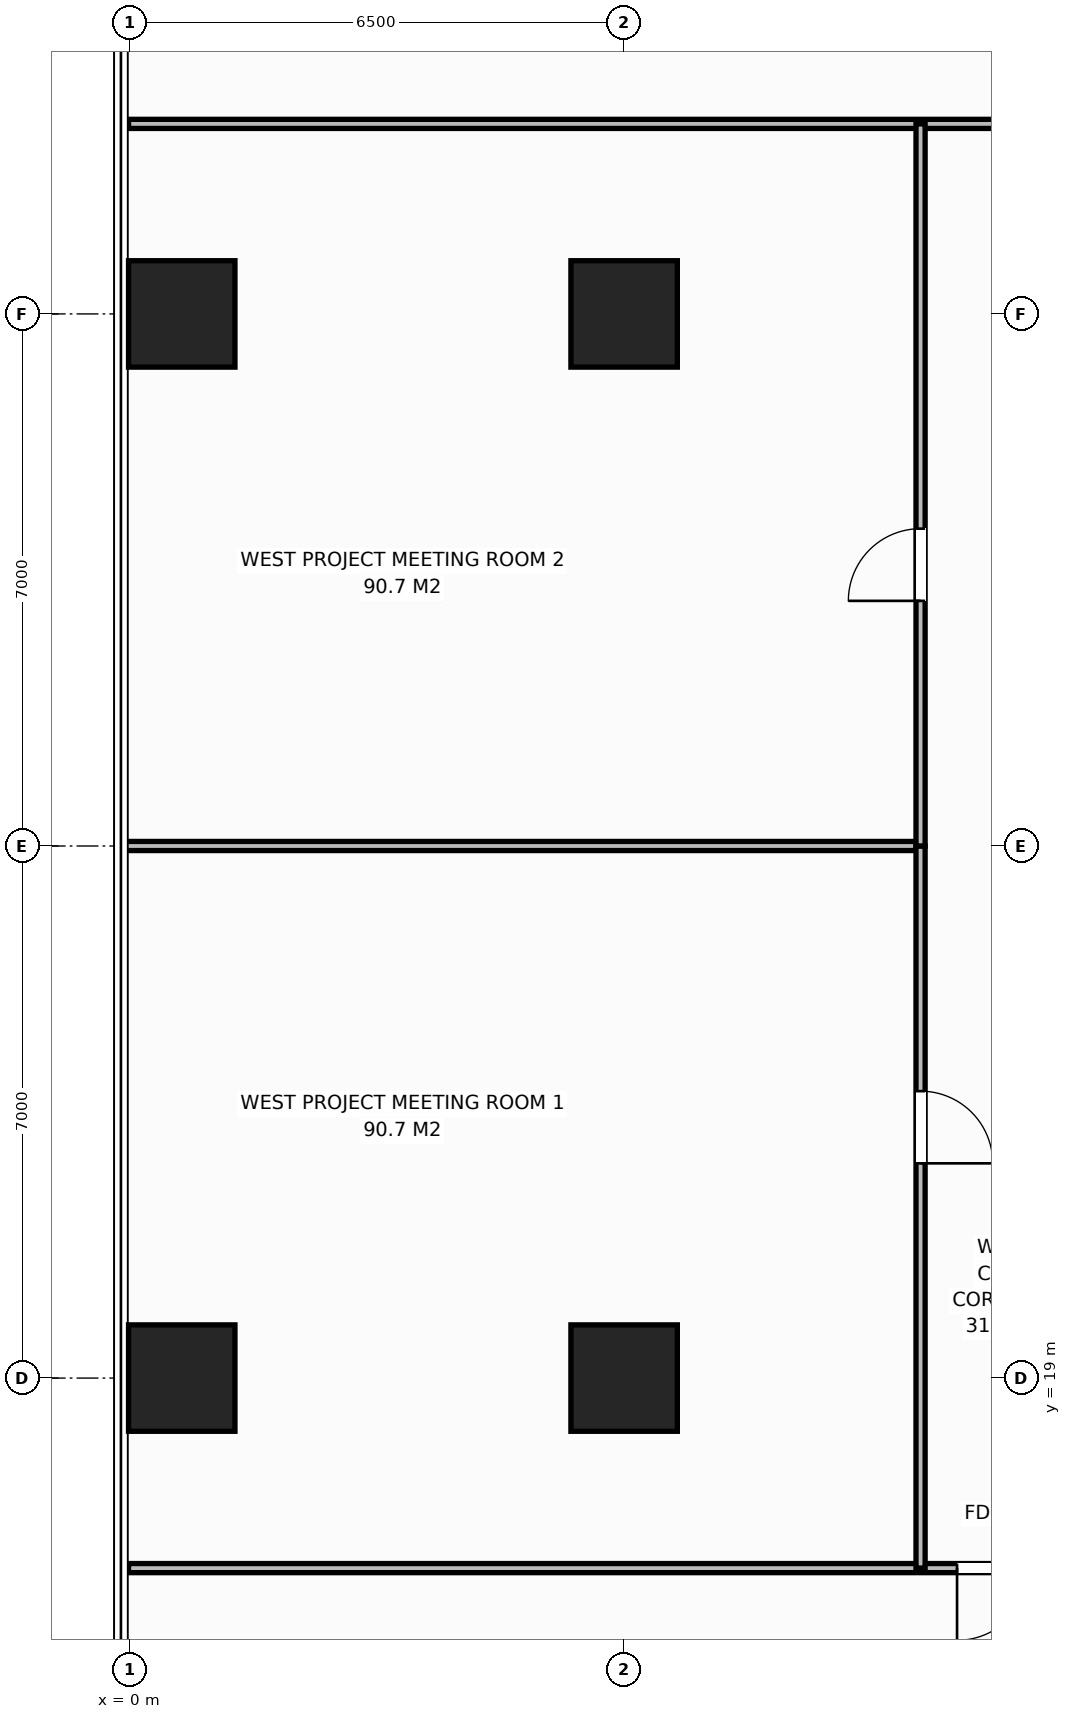
"""IFC4 building model, lengths in metres.
Left out: names, types, materials, properties, quantities, classifications, styles, units other than length and angle.
Written with IfcOpenShell. Run it as: python <this file> out.ifc"""

import sys

from ifc_helpers import new_model, si_unit, direction, frame, frame_2d, origin, origin_2d, place, context, subcontext, project, spatial, rectangle, extrude, element, fill, save


model = new_model("IFC4")
c1 = context("Model", 3, precision=1e-05, world=origin(), true_north=direction((0.0, 1.0)))
c2 = subcontext(c1, "Body", "Model", "MODEL_VIEW")
j1 = project(units=[si_unit("LENGTHUNIT", "METRE"), si_unit("PLANEANGLEUNIT", "RADIAN")], contexts=[c1])
p1 = place(None, origin())
s1 = spatial("IfcSite", under=j1, at=p1, CompositionType="ELEMENT")
p2 = place(p1, origin())
s2 = spatial("IfcBuilding", under=s1, at=p2, CompositionType="ELEMENT")
p3 = place(p2, frame((0.0, 0.0, 43.0)))
s3 = spatial("IfcBuildingStorey", under=s2, at=p3, CompositionType="ELEMENT", Elevation=43.0)
for number, where, z_axis, x_axis in (
    (1, (6.5, 19.0, 0.0), (0.0, 0.0, 1.0), (1.0, 0.0, 0.0)),
    (2, (6.5, 33.0, 0.0), (0.0, 0.0, 1.0), (1.0, 0.0, 0.0)),
    (3, (0.68, 19.0, 0.0), (0.0, 0.0, 1.0), (1.0, 0.0, 0.0)),
    (4, (0.68, 33.0, 0.0), (0.0, 0.0, 1.0), (1.0, 0.0, 0.0)),
):
    element("IfcColumn", number, at=place(p3, frame(where, z_axis=z_axis, x_axis=x_axis)), inside=s3, PredefinedType="COLUMN", context=c2, shape_type="SweptSolid", body=[
        extrude(rectangle(XDim=1.4, YDim=1.4, at=origin_2d()), origin(), (0.0, 0.0, 1.0), 3.8),
    ])
p4 = place(p3, frame((-0.02, 35.5, 0.0), z_axis=(0.0, 0.0, 1.0), x_axis=(1.0, 0.0, 0.0)))
e5 = element("IfcWall", 5, at=p4, inside=s3, PredefinedType="PARTITIONING", context=c2, shape_type="SweptSolid", body=[
    extrude(rectangle(XDim=20.386, YDim=0.12, at=frame_2d((10.193, 0.0))), origin(), (0.0, 0.0, 1.0), 3.55),
])
p5 = place(p4, frame((14.928, 0.0, 0.0)))
e6 = element("IfcOpeningElement", 6, at=p5, cuts=e5, PredefinedType="OPENING", context=c2, shape_type="SweptSolid", body=[
    extrude(rectangle(XDim=0.95, YDim=2.15, at=frame_2d((0.475, 1.075))), frame((0.0, 0.07, 0.0), z_axis=(0.0, -1.0, 0.0), x_axis=(1.0, 0.0, 0.0)), (0.0, 0.0, 1.0), 0.14),
])
p6 = place(p3, frame((-0.02, 16.5, 0.0), z_axis=(0.0, 0.0, 1.0), x_axis=(1.0, 0.0, 0.0)))
e7 = element("IfcWall", 7, at=p6, inside=s3, PredefinedType="PARTITIONING", context=c2, shape_type="SweptSolid", body=[
    extrude(rectangle(XDim=13.16, YDim=0.12, at=frame_2d((6.58, 0.0))), origin(), (0.0, 0.0, 1.0), 3.55),
])
p7 = place(p6, frame((10.9, 0.0, 0.0)))
e8 = element("IfcOpeningElement", 8, at=p7, cuts=e7, PredefinedType="OPENING", context=c2, shape_type="SweptSolid", body=[
    extrude(rectangle(XDim=0.95, YDim=2.15, at=frame_2d((0.475, 1.075))), frame((0.0, 0.07, 0.0), z_axis=(0.0, -1.0, 0.0), x_axis=(1.0, 0.0, 0.0)), (0.0, 0.0, 1.0), 0.14),
])
p8 = place(p3, frame((-0.18, 26.0, 0.0), z_axis=(0.0, 0.0, 1.0), x_axis=(1.0, 0.0, 0.0)))
e9 = element("IfcWall", 9, at=p8, inside=s3, PredefinedType="PARTITIONING", context=c2, shape_type="SweptSolid", body=[
    extrude(rectangle(XDim=10.58, YDim=0.12, at=frame_2d((5.29, 0.0))), origin(), (0.0, 0.0, 1.0), 3.55),
])
p9 = place(p3, frame((10.4, 16.5, 0.0), z_axis=(0.0, 0.0, 1.0), x_axis=(0.0, 1.0, 0.0)))
e10 = element("IfcWall", 10, at=p9, inside=s3, PredefinedType="PARTITIONING", context=c2, shape_type="SweptSolid", body=[
    extrude(rectangle(XDim=9.5, YDim=0.12, at=frame_2d((4.75, 0.0))), origin(), (0.0, 0.0, 1.0), 3.55),
])
p10 = place(p9, frame((5.325, 0.0, 0.0)))
e11 = element("IfcOpeningElement", 11, at=p10, cuts=e10, PredefinedType="OPENING", context=c2, shape_type="SweptSolid", body=[
    extrude(rectangle(XDim=0.95, YDim=2.15, at=frame_2d((0.475, 1.075))), frame((0.0, 0.07, 0.0), z_axis=(0.0, -1.0, 0.0), x_axis=(1.0, 0.0, 0.0)), (0.0, 0.0, 1.0), 0.14),
])
p11 = place(p3, frame((10.4, 26.0, 0.0), z_axis=(0.0, 0.0, 1.0), x_axis=(0.0, 1.0, 0.0)))
e12 = element("IfcWall", 12, at=p11, inside=s3, PredefinedType="PARTITIONING", context=c2, shape_type="SweptSolid", body=[
    extrude(rectangle(XDim=9.5, YDim=0.12, at=frame_2d((4.75, 0.0))), origin(), (0.0, 0.0, 1.0), 3.55),
])
p12 = place(p11, frame((3.225, 0.0, 0.0)))
e13 = element("IfcOpeningElement", 13, at=p12, cuts=e12, PredefinedType="OPENING", context=c2, shape_type="SweptSolid", body=[
    extrude(rectangle(XDim=0.95, YDim=2.15, at=frame_2d((0.475, 1.075))), frame((0.0, 0.07, 0.0), z_axis=(0.0, -1.0, 0.0), x_axis=(1.0, 0.0, 0.0)), (0.0, 0.0, 1.0), 0.14),
])
p13 = place(p7, origin())
e14 = element("IfcDoor", 14, at=p13, inside=s3, OperationType="SINGLE_SWING_RIGHT", PredefinedType="DOOR", context=c2, shape_type="SweptSolid", body=[
    extrude(rectangle(XDim=0.95, YDim=2.15, at=frame_2d((0.475, 1.075))), frame((0.0, 0.025, 0.0), z_axis=(0.0, -1.0, 0.0), x_axis=(1.0, 0.0, 0.0)), (0.0, 0.0, 1.0), 0.05),
])
fill(e8, e14)
p14 = place(p10, origin())
e15 = element("IfcDoor", 15, at=p14, inside=s3, OperationType="SINGLE_SWING_RIGHT", PredefinedType="DOOR", context=c2, shape_type="SweptSolid", body=[
    extrude(rectangle(XDim=0.95, YDim=2.15, at=frame_2d((0.475, 1.075))), frame((0.0, 0.025, 0.0), z_axis=(0.0, -1.0, 0.0), x_axis=(1.0, 0.0, 0.0)), (0.0, 0.0, 1.0), 0.05),
])
fill(e11, e15)
p15 = place(p12, origin())
e16 = element("IfcDoor", 16, at=p15, inside=s3, OperationType="SINGLE_SWING_LEFT", PredefinedType="DOOR", context=c2, shape_type="SweptSolid", body=[
    extrude(rectangle(XDim=0.95, YDim=2.15, at=frame_2d((0.475, 1.075))), frame((0.0, 0.025, 0.0), z_axis=(0.0, -1.0, 0.0), x_axis=(1.0, 0.0, 0.0)), (0.0, 0.0, 1.0), 0.05),
])
fill(e13, e16)
save(model, sys.argv[1])
